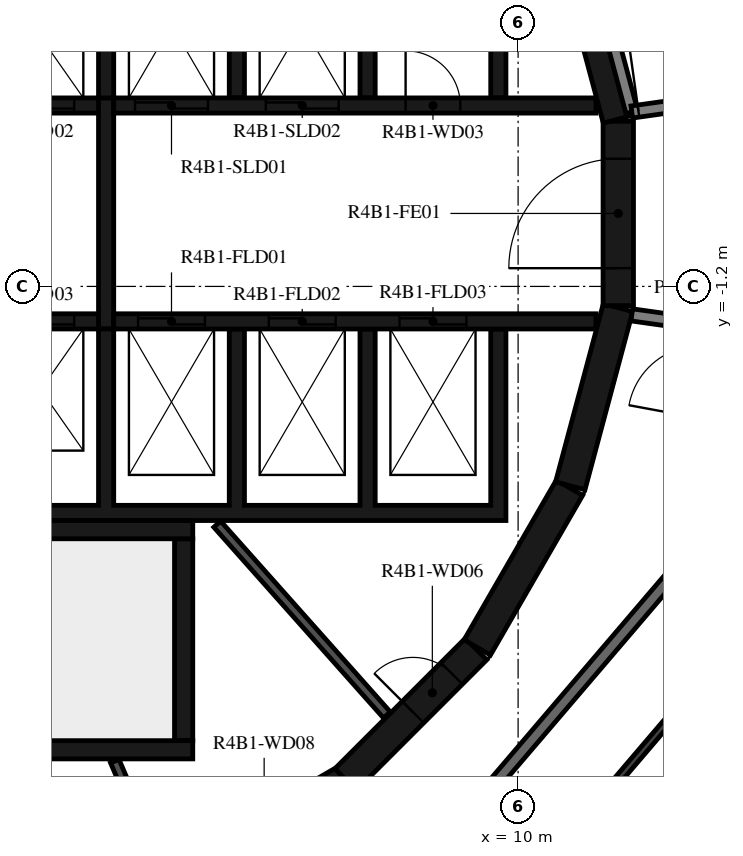
"""IFC4 building model, lengths in metres.
Left out: names, types, materials, properties, quantities, classifications, styles, units other than length and angle.
Written with IfcOpenShell. Run it as: python <this file> out.ifc"""

import sys

from ifc_helpers import new_model, si_unit, direction, frame, frame_2d, origin, place, context, subcontext, project, spatial, polyline, rectangle, outline, extrude, element, fill, save


model = new_model("IFC4")
c1 = context("Model", 3, precision=1e-05, world=origin(), true_north=direction((0.0, 1.0)))
c2 = subcontext(c1, "Body", "Model", "MODEL_VIEW")
j1 = project(units=[si_unit("LENGTHUNIT", "METRE"), si_unit("PLANEANGLEUNIT", "RADIAN")], contexts=[c1])
p1 = place(None, origin())
s1 = spatial("IfcSite", under=j1, at=p1, CompositionType="ELEMENT")
p2 = place(p1, origin())
s2 = spatial("IfcBuilding", under=s1, at=p2, CompositionType="ELEMENT")
p3 = place(p2, frame((0.0, 0.0, 162.2)))
s3 = spatial("IfcBuildingStorey", under=s2, at=p3, CompositionType="ELEMENT", Elevation=162.2)
p4 = place(p3, frame((4.51, -10.845, 0.0), z_axis=(0.0, 0.0, 1.0), x_axis=(0.865975092491, 0.500087131594, 0.0)))
e1 = element("IfcWall", 1, at=p4, inside=s3, PredefinedType="SHEAR", context=c2, shape_type="SweptSolid", body=[
    extrude(rectangle(XDim=3.033, YDim=0.5, at=frame_2d((1.516, 0.0))), origin(), (0.0, 0.0, 1.0), 3.12),
])
p5 = place(p4, frame((1.066, 0.0, 0.0)))
e2 = element("IfcOpeningElement", 2, at=p5, cuts=e1, PredefinedType="OPENING", context=c2, shape_type="SweptSolid", body=[
    extrude(rectangle(XDim=0.9, YDim=2.1, at=frame_2d((0.45, 1.05))), frame((0.0, 0.26, 0.0), z_axis=(0.0, -1.0, 0.0), x_axis=(1.0, 0.0, 0.0)), (0.0, 0.0, 1.0), 0.52),
])
p6 = place(p3, frame((7.164, -9.308, 0.0), z_axis=(0.0, 0.0, 1.0), x_axis=(0.707106781187, 0.707106781187, 0.0)))
e3 = element("IfcWall", 3, at=p6, inside=s3, PredefinedType="SHEAR", context=c2, shape_type="SweptSolid", body=[
    extrude(rectangle(XDim=3.032, YDim=0.5, at=frame_2d((1.516, 0.0))), origin(), (0.0, 0.0, 1.0), 3.12),
])
p7 = place(p6, frame((1.566, 0.0, 0.0)))
e4 = element("IfcOpeningElement", 4, at=p7, cuts=e3, PredefinedType="OPENING", context=c2, shape_type="SweptSolid", body=[
    extrude(rectangle(XDim=0.9, YDim=2.1, at=frame_2d((0.45, 1.05))), frame((0.0, 0.26, 0.0), z_axis=(0.0, -1.0, 0.0), x_axis=(1.0, 0.0, 0.0)), (0.0, 0.0, 1.0), 0.52),
])
for number, where, z_axis, x_axis in (
    (5, (9.329, -7.137, 0.0), (0.0, 0.0, 1.0), (0.5, 0.866, 0.0)),
    (6, (10.858, -4.479, 0.0), (0.0, 0.0, 1.0), (0.259, 0.966, 0.0)),
):
    element("IfcWall", number, at=place(p3, frame(where, z_axis=z_axis, x_axis=x_axis)), inside=s3, PredefinedType="SHEAR", context=c2, shape_type="SweptSolid", body=[
        extrude(rectangle(XDim=3.033, YDim=0.5, at=frame_2d((1.516, 0.0))), origin(), (0.0, 0.0, 1.0), 3.12),
    ])
p8 = place(p3, frame((11.647, -1.516, 0.0), z_axis=(0.0, 0.0, 1.0), x_axis=(0.0, 1.0, 0.0)))
e7 = element("IfcWall", 7, at=p8, inside=s3, PredefinedType="SHEAR", context=c2, shape_type="SweptSolid", body=[
    extrude(rectangle(XDim=3.033, YDim=0.5, at=frame_2d((1.516, 0.0))), origin(), (0.0, 0.0, 1.0), 3.12),
])
p9 = place(p8, frame((0.616, 0.0, 0.0)))
e8 = element("IfcOpeningElement", 8, at=p9, cuts=e7, PredefinedType="OPENING", context=c2, shape_type="SweptSolid", body=[
    extrude(rectangle(XDim=1.8, YDim=2.1, at=frame_2d((0.9, 1.05))), frame((0.0, 0.26, 0.0), z_axis=(0.0, -1.0, 0.0), x_axis=(1.0, 0.0, 0.0)), (0.0, 0.0, 1.0), 0.52),
])
p10 = place(p3, frame((11.643, 1.55, 0.0), z_axis=(0.0, 0.0, 1.0), x_axis=(-0.258734743916, 0.965948410781, 0.0)))
e9 = element("IfcWall", 9, at=p10, inside=s3, PredefinedType="SHEAR", context=c2, shape_type="SweptSolid", body=[
    extrude(rectangle(XDim=3.033, YDim=0.5, at=frame_2d((1.516, 0.0))), origin(), (0.0, 0.0, 1.0), 3.12),
])
p11 = place(p3, frame((-2.4, -5.2, 0.0), z_axis=(0.0, 0.0, 1.0), x_axis=(1.0, 0.0, 0.0)))
e10 = element("IfcWall", 10, at=p11, inside=s3, PredefinedType="SHEAR", context=c2, shape_type="SweptSolid", body=[
    extrude(rectangle(XDim=7.05, YDim=0.3, at=frame_2d((3.525, 0.0))), origin(), (0.0, 0.0, 1.0), 3.12),
])
p12 = place(p3, frame((4.5, -8.67, 0.0), z_axis=(0.0, 0.0, 1.0), x_axis=(0.0, 1.0, 0.0)))
e11 = element("IfcWall", 11, at=p12, inside=s3, PredefinedType="SHEAR", context=c2, shape_type="SweptSolid", body=[
    extrude(rectangle(XDim=3.32, YDim=0.3, at=frame_2d((1.66, 0.0))), origin(), (0.0, 0.0, 1.0), 3.12),
])
p13 = place(p3, frame((0.1, -8.82, 0.0), z_axis=(0.0, 0.0, 1.0), x_axis=(1.0, 0.0, 0.0)))
e12 = element("IfcWall", 12, at=p13, inside=s3, PredefinedType="SHEAR", context=c2, shape_type="SweptSolid", body=[
    extrude(rectangle(XDim=4.55, YDim=0.3, at=frame_2d((2.275, 0.0))), origin(), (0.0, 0.0, 1.0), 3.12),
])
p14 = place(p3, origin())
e13 = element("IfcWall", 13, at=p14, inside=s3, PredefinedType="SHEAR", context=c2, shape_type="SweptSolid", body=[
    extrude(outline(polyline([(-9.55, 4.8), (-5.5, 4.8), (-5.5, 1.9), (-5.25, 1.9), (-5.25, 4.8), (-1.2, 4.8), (-1.2, 1.9), (-0.95, 1.9), (-0.95, 4.8), (0.95, 4.8), (0.95, 1.9), (1.2, 1.9), (1.2, 4.8), (3.1, 4.8), (3.1, 1.9), (3.35, 1.9), (3.35, 4.8), (5.25, 4.8), (5.25, 1.9), (5.5, 1.9), (5.5, 4.8), (7.4, 4.8), (7.4, 1.9), (7.65, 1.9), (7.65, 4.8), (9.55, 4.8), (9.55, 1.9), (9.8, 1.9), (9.8, 4.8), (9.8, 5.05), (-9.8, 5.05), (-9.8, 4.8), (-9.8, 1.9), (-9.55, 1.9), (-9.55, 4.8)])), origin(), (0.0, 0.0, 1.0), 3.12),
])
p15 = place(p3, origin())
e14 = element("IfcWall", 14, at=p15, inside=s3, PredefinedType="SHEAR", context=c2, shape_type="SweptSolid", body=[
    extrude(outline(polyline([(9.8, -5.05), (9.8, -4.8), (9.8, -1.9), (9.55, -1.9), (9.55, -4.8), (7.65, -4.8), (7.65, -1.9), (7.4, -1.9), (7.4, -4.8), (5.5, -4.8), (5.5, -1.9), (5.25, -1.9), (5.25, -4.8), (3.35, -4.8), (3.35, -1.9), (3.1, -1.9), (3.1, -4.8), (1.2, -4.8), (1.2, -1.9), (0.95, -1.9), (0.95, -4.8), (-5.25, -4.8), (-5.25, -1.9), (-5.5, -1.9), (-5.5, -4.8), (-7.4, -4.8), (-7.4, -1.9), (-7.65, -1.9), (-7.65, -4.8), (-9.55, -4.8), (-9.55, -1.9), (-9.8, -1.9), (-9.8, -4.8), (-9.8, -5.05), (9.8, -5.05)])), origin(), (0.0, 0.0, 1.0), 3.12),
])
p16 = place(p3, frame((-11.28, 1.775, 0.0), z_axis=(0.0, 0.0, 1.0), x_axis=(1.0, 0.0, 0.0)))
e15 = element("IfcWall", 15, at=p16, inside=s3, PredefinedType="SHEAR", context=c2, shape_type="SweptSolid", body=[
    extrude(rectangle(XDim=14.38, YDim=0.25, at=frame_2d((7.19, 0.0))), origin(), (0.0, 0.0, 1.0), 3.12),
])
p17 = place(p16, frame((10.73, 0.0, 0.0)))
e16 = element("IfcOpeningElement", 16, at=p17, cuts=e15, PredefinedType="OPENING", context=c2, shape_type="SweptSolid", body=[
    extrude(rectangle(XDim=1.1, YDim=2.1, at=frame_2d((0.55, 1.05))), frame((0.0, 0.135, 0.0), z_axis=(0.0, -1.0, 0.0), x_axis=(1.0, 0.0, 0.0)), (0.0, 0.0, 1.0), 0.27),
])
p18 = place(p16, frame((12.88, 0.0, 0.0)))
e17 = element("IfcOpeningElement", 17, at=p18, cuts=e15, PredefinedType="OPENING", context=c2, shape_type="SweptSolid", body=[
    extrude(rectangle(XDim=1.1, YDim=2.1, at=frame_2d((0.55, 1.05))), frame((0.0, 0.135, 0.0), z_axis=(0.0, -1.0, 0.0), x_axis=(1.0, 0.0, 0.0)), (0.0, 0.0, 1.0), 0.27),
])
p19 = place(p16, frame((3.305, 0.0, 0.0)))
e18 = element("IfcOpeningElement", 18, at=p19, cuts=e15, PredefinedType="OPENING", context=c2, shape_type="SweptSolid", body=[
    extrude(rectangle(XDim=0.9, YDim=2.1, at=frame_2d((0.45, 1.05))), frame((0.0, 0.135, 0.0), z_axis=(0.0, -1.0, 0.0), x_axis=(1.0, 0.0, 0.0)), (0.0, 0.0, 1.0), 0.27),
])
p20 = place(p16, frame((7.605, 0.0, 0.0)))
e19 = element("IfcOpeningElement", 19, at=p20, cuts=e15, PredefinedType="OPENING", context=c2, shape_type="SweptSolid", body=[
    extrude(rectangle(XDim=0.9, YDim=2.1, at=frame_2d((0.45, 1.05))), frame((0.0, 0.135, 0.0), z_axis=(0.0, -1.0, 0.0), x_axis=(1.0, 0.0, 0.0)), (0.0, 0.0, 1.0), 0.27),
])
p21 = place(p3, frame((3.35, 1.775, 0.0), z_axis=(0.0, 0.0, 1.0), x_axis=(1.0, 0.0, 0.0)))
e20 = element("IfcWall", 20, at=p21, inside=s3, PredefinedType="SHEAR", context=c2, shape_type="SweptSolid", body=[
    extrude(rectangle(XDim=7.93, YDim=0.25, at=frame_2d((3.965, 0.0))), origin(), (0.0, 0.0, 1.0), 3.12),
])
p22 = place(p21, frame((0.35, 0.0, 0.0)))
e21 = element("IfcOpeningElement", 21, at=p22, cuts=e20, PredefinedType="OPENING", context=c2, shape_type="SweptSolid", body=[
    extrude(rectangle(XDim=1.2, YDim=2.4, at=frame_2d((0.6, 1.2))), frame((0.0, 0.135, 0.0), z_axis=(0.0, -1.0, 0.0), x_axis=(1.0, 0.0, 0.0)), (0.0, 0.0, 1.0), 0.27),
])
p23 = place(p21, frame((2.5, 0.0, 0.0)))
e22 = element("IfcOpeningElement", 22, at=p23, cuts=e20, PredefinedType="OPENING", context=c2, shape_type="SweptSolid", body=[
    extrude(rectangle(XDim=1.2, YDim=2.4, at=frame_2d((0.6, 1.2))), frame((0.0, 0.135, 0.0), z_axis=(0.0, -1.0, 0.0), x_axis=(1.0, 0.0, 0.0)), (0.0, 0.0, 1.0), 0.27),
])
p24 = place(p21, frame((4.8, 0.0, 0.0)))
e23 = element("IfcOpeningElement", 23, at=p24, cuts=e20, PredefinedType="OPENING", context=c2, shape_type="SweptSolid", body=[
    extrude(rectangle(XDim=0.9, YDim=2.1, at=frame_2d((0.45, 1.05))), frame((0.0, 0.135, 0.0), z_axis=(0.0, -1.0, 0.0), x_axis=(1.0, 0.0, 0.0)), (0.0, 0.0, 1.0), 0.27),
])
p25 = place(p3, frame((-11.28, -1.775, 0.0), z_axis=(0.0, 0.0, 1.0), x_axis=(1.0, 0.0, 0.0)))
e24 = element("IfcWall", 24, at=p25, inside=s3, PredefinedType="SHEAR", context=c2, shape_type="SweptSolid", body=[
    extrude(rectangle(XDim=14.38, YDim=0.25, at=frame_2d((7.19, 0.0))), origin(), (0.0, 0.0, 1.0), 3.12),
])
p26 = place(p25, frame((12.88, 0.0, 0.0)))
e25 = element("IfcOpeningElement", 25, at=p26, cuts=e24, PredefinedType="OPENING", context=c2, shape_type="SweptSolid", body=[
    extrude(rectangle(XDim=1.1, YDim=2.1, at=frame_2d((0.55, 1.05))), frame((0.0, 0.135, 0.0), z_axis=(0.0, -1.0, 0.0), x_axis=(1.0, 0.0, 0.0)), (0.0, 0.0, 1.0), 0.27),
])
p27 = place(p25, frame((8.68, 0.0, 0.0)))
e26 = element("IfcOpeningElement", 26, at=p27, cuts=e24, PredefinedType="OPENING", context=c2, shape_type="SweptSolid", body=[
    extrude(rectangle(XDim=0.9, YDim=2.1, at=frame_2d((0.45, 1.05))), frame((0.0, 0.135, 0.0), z_axis=(0.0, -1.0, 0.0), x_axis=(1.0, 0.0, 0.0)), (0.0, 0.0, 1.0), 0.27),
])
p28 = place(p3, frame((3.35, -1.775, 0.0), z_axis=(0.0, 0.0, 1.0), x_axis=(1.0, 0.0, 0.0)))
e27 = element("IfcWall", 27, at=p28, inside=s3, PredefinedType="SHEAR", context=c2, shape_type="SweptSolid", body=[
    extrude(rectangle(XDim=7.93, YDim=0.25, at=frame_2d((3.965, 0.0))), origin(), (0.0, 0.0, 1.0), 3.12),
])
p29 = place(p28, frame((0.4, 0.0, 0.0)))
e28 = element("IfcOpeningElement", 28, at=p29, cuts=e27, PredefinedType="OPENING", context=c2, shape_type="SweptSolid", body=[
    extrude(rectangle(XDim=1.1, YDim=2.4, at=frame_2d((0.55, 1.2))), frame((0.0, 0.135, 0.0), z_axis=(0.0, -1.0, 0.0), x_axis=(1.0, 0.0, 0.0)), (0.0, 0.0, 1.0), 0.27),
])
p30 = place(p28, frame((2.55, 0.0, 0.0)))
e29 = element("IfcOpeningElement", 29, at=p30, cuts=e27, PredefinedType="OPENING", context=c2, shape_type="SweptSolid", body=[
    extrude(rectangle(XDim=1.1, YDim=2.4, at=frame_2d((0.55, 1.2))), frame((0.0, 0.135, 0.0), z_axis=(0.0, -1.0, 0.0), x_axis=(1.0, 0.0, 0.0)), (0.0, 0.0, 1.0), 0.27),
])
p31 = place(p28, frame((4.7, 0.0, 0.0)))
e30 = element("IfcOpeningElement", 30, at=p31, cuts=e27, PredefinedType="OPENING", context=c2, shape_type="SweptSolid", body=[
    extrude(rectangle(XDim=1.1, YDim=2.4, at=frame_2d((0.55, 1.2))), frame((0.0, 0.135, 0.0), z_axis=(0.0, -1.0, 0.0), x_axis=(1.0, 0.0, 0.0)), (0.0, 0.0, 1.0), 0.27),
])
p32 = place(p3, frame((3.225, -1.9, 0.0), z_axis=(0.0, 0.0, 1.0), x_axis=(0.0, 1.0, 0.0)))
e31 = element("IfcWall", 31, at=p32, inside=s3, PredefinedType="SHEAR", context=c2, shape_type="SweptSolid", body=[
    extrude(rectangle(XDim=3.8, YDim=0.25, at=frame_2d((1.9, 0.0))), origin(), (0.0, 0.0, 1.0), 3.12),
])
p33 = place(p3, frame((7.842, -8.248, 0.0), z_axis=(0.0, 0.0, 1.0), x_axis=(-0.66446128181, 0.747322691329, 0.0)))
e32 = element("IfcWall", 32, at=p33, inside=s3, PredefinedType="PARTITIONING", context=c2, shape_type="SweptSolid", body=[
    extrude(rectangle(XDim=4.198, YDim=0.15, at=frame_2d((2.099, 0.0))), origin(), (0.0, 0.0, 1.0), 3.12),
])
p34 = place(p3, frame((3.367, -9.007, 0.0), z_axis=(0.0, 0.0, 1.0), x_axis=(0.394387482265, -0.918944238696, 0.0)))
e33 = element("IfcWall", 33, at=p34, inside=s3, PredefinedType="PARTITIONING", context=c2, shape_type="SweptSolid", body=[
    extrude(rectangle(XDim=1.825, YDim=0.15, at=frame_2d((0.913, 0.0))), origin(), (0.0, 0.0, 1.0), 3.12),
])
p35 = place(p3, frame((11.87, 1.668, 0.0), z_axis=(0.0, 0.0, 1.0), x_axis=(-0.258836880648, 0.965921047093, 0.0)))
e34 = element("IfcWall", 34, at=p35, inside=s3, PredefinedType="STANDARD", context=c2, shape_type="SweptSolid", body=[
    extrude(rectangle(XDim=1.695, YDim=0.2, at=frame_2d((0.848, 0.0))), origin(), (0.0, 0.0, 1.0), 3.12),
])
p36 = place(p3, frame((11.87, 1.668, 0.0), z_axis=(0.0, 0.0, 1.0), x_axis=(0.990270910415, 0.139152879904, 0.0)))
e35 = element("IfcWall", 35, at=p36, inside=s3, PredefinedType="STANDARD", context=c2, shape_type="SweptSolid", body=[
    extrude(rectangle(XDim=1.688, YDim=0.2, at=frame_2d((0.844, 0.0))), origin(), (0.0, 0.0, 1.0), 3.12),
])
p37 = place(p36, frame((0.11, 0.0, 0.0)))
e36 = element("IfcOpeningElement", 36, at=p37, cuts=e35, PredefinedType="OPENING", context=c2, shape_type="SweptSolid", body=[
    extrude(rectangle(XDim=1.2, YDim=2.1, at=frame_2d((0.6, 1.05))), frame((0.0, 0.11, 0.0), z_axis=(0.0, -1.0, 0.0), x_axis=(1.0, 0.0, 0.0)), (0.0, 0.0, 1.0), 0.22),
])
p38 = place(p3, frame((13.542, 1.903, 0.0), z_axis=(0.0, 0.0, 1.0), x_axis=(-0.333808508206, 0.942640907159, 0.0)))
e37 = element("IfcWall", 37, at=p38, inside=s3, PredefinedType="STANDARD", context=c2, shape_type="SweptSolid", body=[
    extrude(rectangle(XDim=6.317, YDim=0.2, at=frame_2d((3.158, 0.0))), origin(), (0.0, 0.0, 1.0), 3.12),
])
p39 = place(p3, frame((13.282, -1.867, 0.0), z_axis=(0.0, 0.0, 1.0), x_axis=(-0.990265430288, 0.139191873241, 0.0)))
e38 = element("IfcWall", 38, at=p39, inside=s3, PredefinedType="STANDARD", context=c2, shape_type="SweptSolid", body=[
    extrude(rectangle(XDim=1.426, YDim=0.2, at=frame_2d((0.713, 0.0))), origin(), (0.0, 0.0, 1.0), 3.12),
])
p40 = place(p3, frame((7.858, -11.433, 0.0), z_axis=(0.0, 0.0, 1.0), x_axis=(0.649440801937, 0.760412154545, 0.0)))
e39 = element("IfcWall", 39, at=p40, inside=s3, PredefinedType="STANDARD", context=c2, shape_type="SweptSolid", body=[
    extrude(rectangle(XDim=7.181, YDim=0.2, at=frame_2d((3.59, 0.0))), origin(), (0.0, 0.0, 1.0), 3.12),
])
p41 = place(p40, frame((0.592, 0.0, 0.0)))
e40 = element("IfcOpeningElement", 40, at=p41, cuts=e39, PredefinedType="OPENING", context=c2, shape_type="SweptSolid", body=[
    extrude(rectangle(XDim=1.0, YDim=2.1, at=frame_2d((0.5, 1.05))), frame((0.0, 0.11, 0.0), z_axis=(0.0, -1.0, 0.0), x_axis=(1.0, 0.0, 0.0)), (0.0, 0.0, 1.0), 0.22),
])
p42 = place(p3, frame((8.737, -12.713, 0.0), z_axis=(0.0, 0.0, 1.0), x_axis=(0.649430604754, 0.760420863476, 0.0)))
e41 = element("IfcWall", 41, at=p42, inside=s3, PredefinedType="PARTITIONING", context=c2, shape_type="SweptSolid", body=[
    extrude(rectangle(XDim=7.985, YDim=0.12, at=frame_2d((3.992, 0.0))), origin(), (0.0, 0.0, 1.0), 3.12),
])
p43 = place(p42, frame((1.4, 0.0, 0.0)))
e42 = element("IfcOpeningElement", 42, at=p43, cuts=e41, PredefinedType="OPENING", context=c2, shape_type="SweptSolid", body=[
    extrude(rectangle(XDim=0.8, YDim=2.1, at=frame_2d((0.4, 1.05))), frame((0.0, 0.07, 0.0), z_axis=(0.0, -1.0, 0.0), x_axis=(1.0, 0.0, 0.0)), (0.0, 0.0, 1.0), 0.14),
])
p44 = place(p9, origin())
e43 = element("IfcDoor", 43, at=p44, inside=s3, OperationType="DOUBLE_DOOR_SINGLE_SWING", PredefinedType="DOOR", context=c2, shape_type="SweptSolid", body=[
    extrude(rectangle(XDim=1.8, YDim=2.1, at=frame_2d((0.9, 1.05))), frame((0.0, 0.025, 0.0), z_axis=(0.0, -1.0, 0.0), x_axis=(1.0, 0.0, 0.0)), (0.0, 0.0, 1.0), 0.05),
])
fill(e8, e43)
p45 = place(p18, origin())
e44 = element("IfcDoor", 44, at=p45, inside=s3, OperationType="DOUBLE_DOOR_SLIDING", PredefinedType="DOOR", context=c2, shape_type="SweptSolid", body=[
    extrude(rectangle(XDim=1.1, YDim=2.1, at=frame_2d((0.55, 1.05))), frame((0.0, 0.025, 0.0), z_axis=(0.0, -1.0, 0.0), x_axis=(1.0, 0.0, 0.0)), (0.0, 0.0, 1.0), 0.05),
])
fill(e17, e44)
p46 = place(p22, origin())
e45 = element("IfcDoor", 45, at=p46, inside=s3, OperationType="DOUBLE_DOOR_SLIDING", PredefinedType="DOOR", context=c2, shape_type="SweptSolid", body=[
    extrude(rectangle(XDim=1.2, YDim=2.4, at=frame_2d((0.6, 1.2))), frame((0.0, 0.025, 0.0), z_axis=(0.0, -1.0, 0.0), x_axis=(1.0, 0.0, 0.0)), (0.0, 0.0, 1.0), 0.05),
])
fill(e21, e45)
p47 = place(p23, origin())
e46 = element("IfcDoor", 46, at=p47, inside=s3, OperationType="DOUBLE_DOOR_SLIDING", PredefinedType="DOOR", context=c2, shape_type="SweptSolid", body=[
    extrude(rectangle(XDim=1.2, YDim=2.4, at=frame_2d((0.6, 1.2))), frame((0.0, 0.025, 0.0), z_axis=(0.0, -1.0, 0.0), x_axis=(1.0, 0.0, 0.0)), (0.0, 0.0, 1.0), 0.05),
])
fill(e22, e46)
p48 = place(p26, origin())
e47 = element("IfcDoor", 47, at=p48, inside=s3, OperationType="DOUBLE_DOOR_SLIDING", PredefinedType="DOOR", context=c2, shape_type="SweptSolid", body=[
    extrude(rectangle(XDim=1.1, YDim=2.1, at=frame_2d((0.55, 1.05))), frame((0.0, 0.025, 0.0), z_axis=(0.0, -1.0, 0.0), x_axis=(1.0, 0.0, 0.0)), (0.0, 0.0, 1.0), 0.05),
])
fill(e25, e47)
p49 = place(p29, origin())
e48 = element("IfcDoor", 48, at=p49, inside=s3, OperationType="DOUBLE_DOOR_SLIDING", PredefinedType="DOOR", context=c2, shape_type="SweptSolid", body=[
    extrude(rectangle(XDim=1.1, YDim=2.4, at=frame_2d((0.55, 1.2))), frame((0.0, 0.025, 0.0), z_axis=(0.0, -1.0, 0.0), x_axis=(1.0, 0.0, 0.0)), (0.0, 0.0, 1.0), 0.05),
])
fill(e28, e48)
p50 = place(p30, origin())
e49 = element("IfcDoor", 49, at=p50, inside=s3, OperationType="DOUBLE_DOOR_SLIDING", PredefinedType="DOOR", context=c2, shape_type="SweptSolid", body=[
    extrude(rectangle(XDim=1.1, YDim=2.4, at=frame_2d((0.55, 1.2))), frame((0.0, 0.025, 0.0), z_axis=(0.0, -1.0, 0.0), x_axis=(1.0, 0.0, 0.0)), (0.0, 0.0, 1.0), 0.05),
])
fill(e29, e49)
p51 = place(p31, origin())
e50 = element("IfcDoor", 50, at=p51, inside=s3, OperationType="DOUBLE_DOOR_SLIDING", PredefinedType="DOOR", context=c2, shape_type="SweptSolid", body=[
    extrude(rectangle(XDim=1.1, YDim=2.4, at=frame_2d((0.55, 1.2))), frame((0.0, 0.025, 0.0), z_axis=(0.0, -1.0, 0.0), x_axis=(1.0, 0.0, 0.0)), (0.0, 0.0, 1.0), 0.05),
])
fill(e30, e50)
p52 = place(p24, origin())
e51 = element("IfcDoor", 51, at=p52, inside=s3, OperationType="SINGLE_SWING_LEFT", PredefinedType="DOOR", context=c2, shape_type="SweptSolid", body=[
    extrude(rectangle(XDim=0.9, YDim=2.1, at=frame_2d((0.45, 1.05))), frame((0.0, 0.025, 0.0), z_axis=(0.0, -1.0, 0.0), x_axis=(1.0, 0.0, 0.0)), (0.0, 0.0, 1.0), 0.05),
])
fill(e23, e51)
p53 = place(p7, origin())
e52 = element("IfcDoor", 52, at=p53, inside=s3, OperationType="SINGLE_SWING_RIGHT", PredefinedType="DOOR", context=c2, shape_type="SweptSolid", body=[
    extrude(rectangle(XDim=0.9, YDim=2.1, at=frame_2d((0.45, 1.05))), frame((0.0, 0.025, 0.0), z_axis=(0.0, -1.0, 0.0), x_axis=(1.0, 0.0, 0.0)), (0.0, 0.0, 1.0), 0.05),
])
fill(e4, e52)
p54 = place(p37, origin())
e53 = element("IfcDoor", 53, at=p54, inside=s3, OperationType="DOUBLE_DOOR_SINGLE_SWING", PredefinedType="DOOR", context=c2, shape_type="SweptSolid", body=[
    extrude(rectangle(XDim=1.2, YDim=2.1, at=frame_2d((0.6, 1.05))), frame((0.0, 0.025, 0.0), z_axis=(0.0, -1.0, 0.0), x_axis=(1.0, 0.0, 0.0)), (0.0, 0.0, 1.0), 0.05),
])
fill(e36, e53)
save(model, sys.argv[1])
